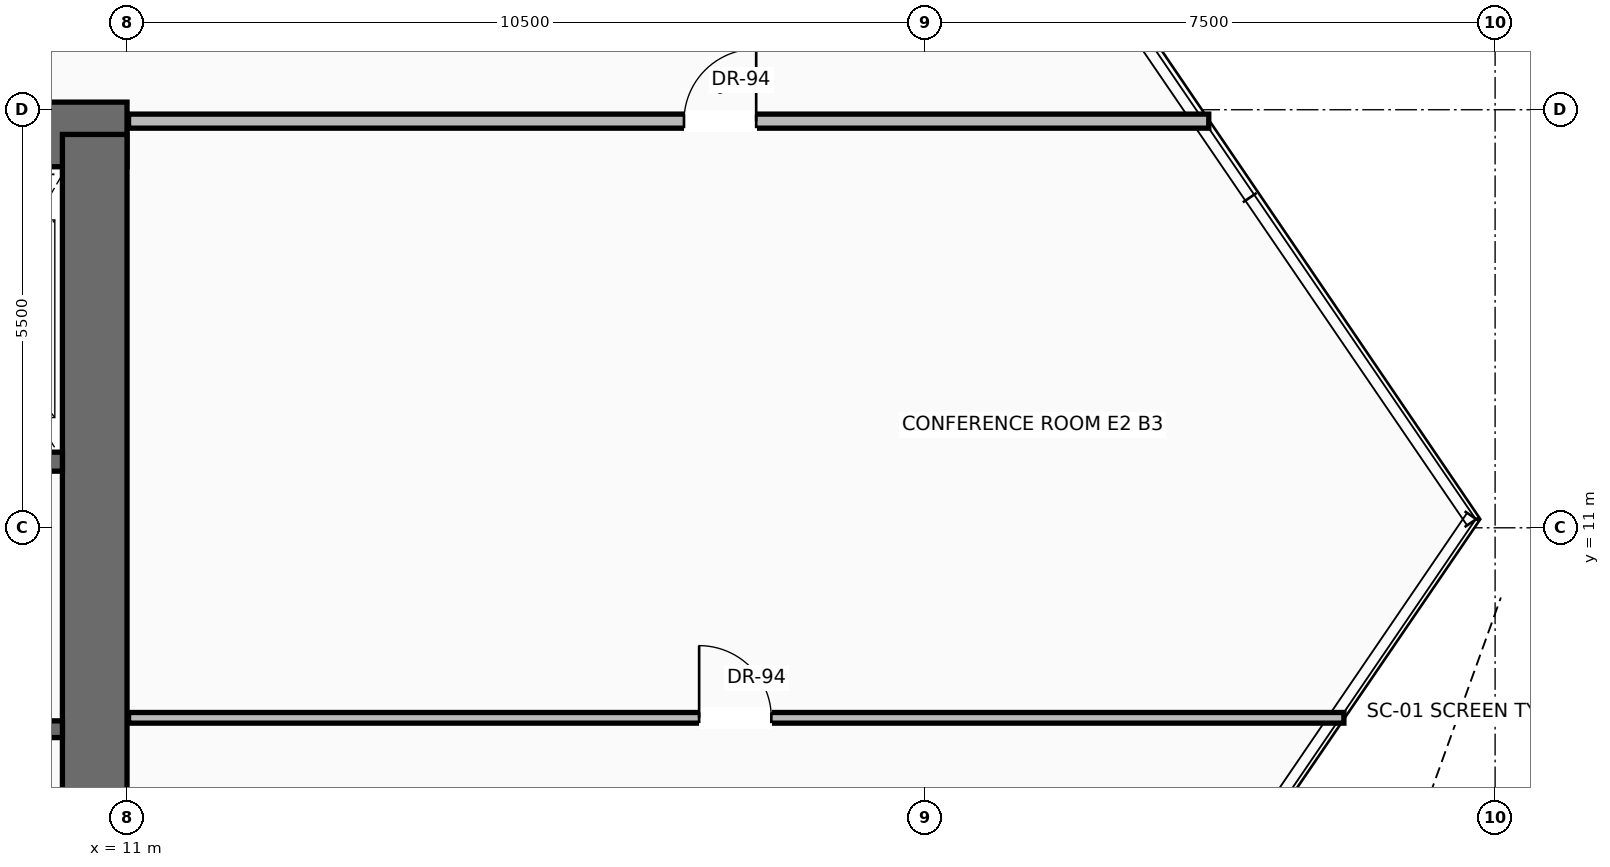
"""IFC4 building model, lengths in metres.
Left out: names, types, materials, properties, quantities, classifications, styles, units other than length and angle.
Written with IfcOpenShell. Run it as: python <this file> out.ifc"""

import sys

from ifc_helpers import new_model, si_unit, direction, frame, frame_2d, origin, place, context, subcontext, project, spatial, rectangle, extrude, source, transform, mapped, element, fill, save


model = new_model("IFC4")
c1 = context("Model", 3, precision=1e-05, world=origin(), true_north=direction((0.0, 1.0)))
c2 = subcontext(c1, "Body", "Model", "MODEL_VIEW")
j1 = project(units=[si_unit("LENGTHUNIT", "METRE"), si_unit("PLANEANGLEUNIT", "RADIAN")], contexts=[c1])
p1 = place(None, origin())
s1 = spatial("IfcSite", under=j1, at=p1, CompositionType="ELEMENT")
p2 = place(p1, origin())
s2 = spatial("IfcBuilding", under=s1, at=p2, CompositionType="ELEMENT")
p3 = place(p2, frame((0.0, 0.0, 31.2)))
s3 = spatial("IfcBuildingStorey", under=s2, at=p3, CompositionType="ELEMENT", Elevation=31.2)
p4 = place(p3, frame((-11.0, 16.175, 0.0), z_axis=(0.0, 0.0, 1.0), x_axis=(1.0, 0.0, 0.0)))
e1 = element("IfcWall", 1, at=p4, inside=s3, PredefinedType="SHEAR", context=c2, shape_type="SweptSolid", body=[
    extrude(rectangle(XDim=22.0, YDim=0.85, at=frame_2d((11.0, 0.0))), origin(), (0.0, 0.0, 1.0), 3.45),
])
p5 = place(p4, frame((3.57, 0.0, 0.0)))
e2 = element("IfcOpeningElement", 2, at=p5, cuts=e1, PredefinedType="OPENING", context=c2, shape_type="SweptSolid", body=[
    extrude(rectangle(XDim=1.3, YDim=2.3, at=frame_2d((0.65, 1.15))), frame((0.0, 0.435, 0.0), z_axis=(0.0, -1.0, 0.0), x_axis=(1.0, 0.0, 0.0)), (0.0, 0.0, 1.0), 0.87),
])
p6 = place(p4, frame((10.0, 0.0, 0.0)))
e3 = element("IfcOpeningElement", 3, at=p6, cuts=e1, PredefinedType="OPENING", context=c2, shape_type="SweptSolid", body=[
    extrude(rectangle(XDim=2.0, YDim=2.4, at=frame_2d((1.0, 1.2))), frame((0.0, 0.435, 0.0), z_axis=(0.0, -1.0, 0.0), x_axis=(1.0, 0.0, 0.0)), (0.0, 0.0, 1.0), 0.87),
])
p7 = place(p3, frame((10.575, 0.425, 0.0), z_axis=(0.0, 0.0, 1.0), x_axis=(0.0, 1.0, 0.0)))
e4 = element("IfcWall", 4, at=p7, inside=s3, PredefinedType="SHEAR", context=c2, shape_type="SweptSolid", body=[
    extrude(rectangle(XDim=15.75, YDim=0.85, at=frame_2d((7.875, 0.0))), origin(), (0.0, 0.0, 1.0), 3.45),
])
p8 = place(p3, frame((10.15, 8.35, 0.0), z_axis=(0.0, 0.0, 1.0), x_axis=(-1.0, 0.0, 0.0)))
e5 = element("IfcWall", 5, at=p8, inside=s3, PredefinedType="SOLIDWALL", context=c2, shape_type="SweptSolid", body=[
    extrude(rectangle(XDim=4.65, YDim=0.22, at=frame_2d((2.325, 0.0))), origin(), (0.0, 0.0, 1.0), 3.45),
])
p9 = place(p8, frame((1.0, 0.0, 0.0)))
e6 = element("IfcOpeningElement", 6, at=p9, cuts=e5, PredefinedType="OPENING", context=c2, shape_type="SweptSolid", body=[
    extrude(rectangle(XDim=1.15, YDim=2.2, at=frame_2d((0.575, 1.1))), frame((0.0, 0.12, 0.0), z_axis=(0.0, -1.0, 0.0), x_axis=(1.0, 0.0, 0.0)), (0.0, 0.0, 1.0), 0.24),
])
p10 = place(p3, frame((10.15, 11.87, 0.0), z_axis=(0.0, 0.0, 1.0), x_axis=(-1.0, 0.0, 0.0)))
e7 = element("IfcWall", 7, at=p10, inside=s3, PredefinedType="SOLIDWALL", context=c2, shape_type="SweptSolid", body=[
    extrude(rectangle(XDim=4.65, YDim=0.25, at=frame_2d((2.325, 0.0))), origin(), (0.0, 0.0, 1.0), 3.45),
])
p11 = place(p10, frame((0.5, 0.0, 0.0)))
e8 = element("IfcOpeningElement", 8, at=p11, cuts=e7, PredefinedType="OPENING", context=c2, shape_type="SweptSolid", body=[
    extrude(rectangle(XDim=1.2, YDim=2.25, at=frame_2d((0.6, 1.125))), frame((0.0, 0.135, 0.0), z_axis=(0.0, -1.0, 0.0), x_axis=(1.0, 0.0, 0.0)), (0.0, 0.0, 1.0), 0.27),
])
p12 = place(p3, frame((11.02, 16.35, 0.0), z_axis=(0.0, 0.0, 1.0), x_axis=(1.0, 0.0, 0.0)))
e9 = element("IfcWall", 9, at=p12, inside=s3, PredefinedType="PARTITIONING", context=c2, shape_type="SweptSolid", body=[
    extrude(rectangle(XDim=14.213, YDim=0.185, at=frame_2d((7.106, 0.0))), origin(), (0.0, 0.0, 1.0), 2.747),
])
p13 = place(p12, frame((7.308, 0.0, 0.0)))
e10 = element("IfcOpeningElement", 10, at=p13, cuts=e9, PredefinedType="OPENING", context=c2, shape_type="SweptSolid", body=[
    extrude(rectangle(XDim=0.95, YDim=2.2, at=frame_2d((0.475, 1.1))), frame((0.0, 0.103, 0.0), z_axis=(0.0, -1.0, 0.0), x_axis=(1.0, 0.0, 0.0)), (0.0, 0.0, 1.0), 0.205),
])
p14 = place(p3, frame((11.02, 8.5, 0.0), z_axis=(0.0, 0.0, 1.0), x_axis=(1.0, 0.0, 0.0)))
e11 = element("IfcWall", 11, at=p14, inside=s3, PredefinedType="PARTITIONING", context=c2, shape_type="SweptSolid", body=[
    extrude(rectangle(XDim=15.99, YDim=0.14, at=frame_2d((7.995, 0.0))), origin(), (0.0, 0.0, 1.0), 3.442),
])
p15 = place(p14, frame((7.507, 0.0, 0.0)))
e12 = element("IfcOpeningElement", 12, at=p15, cuts=e11, PredefinedType="OPENING", context=c2, shape_type="SweptSolid", body=[
    extrude(rectangle(XDim=0.95, YDim=2.2, at=frame_2d((0.475, 1.1))), frame((0.0, 0.08, 0.0), z_axis=(0.0, -1.0, 0.0), x_axis=(1.0, 0.0, 0.0)), (0.0, 0.0, 1.0), 0.16),
])
m1 = source(origin(), c2, "Body", "SweptSolid", [
    extrude(rectangle(XDim=0.95, YDim=2.2, at=frame_2d((0.475, 1.1))), frame((0.0, 0.025, 0.0), z_axis=(0.0, -1.0, 0.0), x_axis=(1.0, 0.0, 0.0)), (0.0, 0.0, 1.0), 0.05),
])
p16 = place(p13, origin())
e13 = element("IfcDoor", 13, at=p16, inside=s3, OperationType="SINGLE_SWING_RIGHT", PredefinedType="DOOR", context=c2, shape_type="MappedRepresentation", body=[
    mapped(m1, transform((0.0, 0.0, 0.0), scale=1.0)),
])
fill(e10, e13)
p17 = place(p15, origin())
e14 = element("IfcDoor", 14, at=p17, inside=s3, OperationType="SINGLE_SWING_LEFT", PredefinedType="DOOR", context=c2, shape_type="MappedRepresentation", body=[
    mapped(m1, transform((0.0, 0.0, 0.0), scale=1.0)),
])
fill(e12, e14)
save(model, sys.argv[1])
